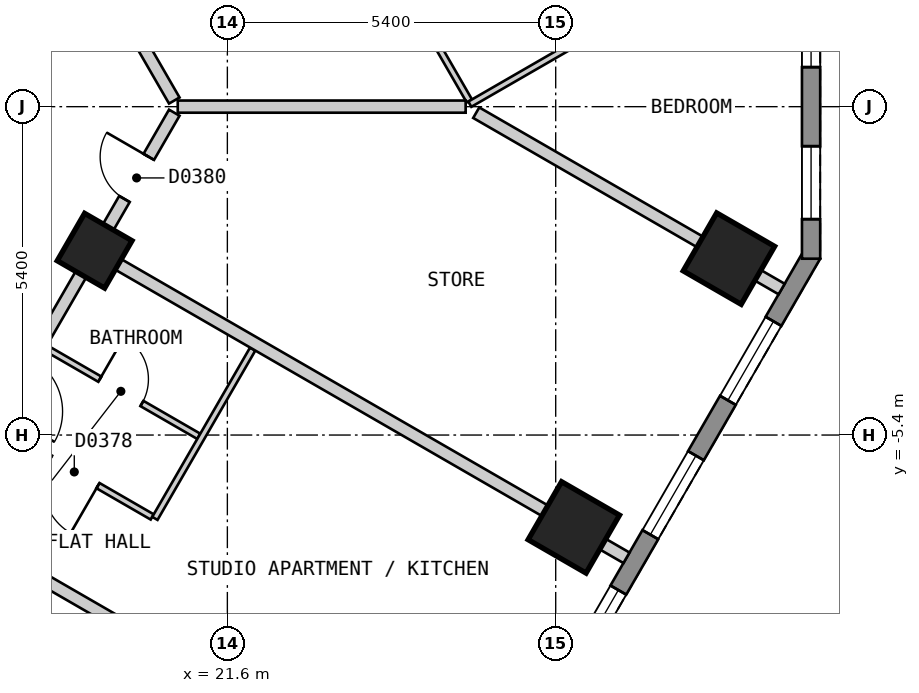
"""IFC4 building model, lengths in metres.
Left out: names, types, materials, properties, quantities, classifications, styles, units other than length and angle.
Written with IfcOpenShell. Run it as: python <this file> out.ifc"""

import sys

from ifc_helpers import new_model, si_unit, direction, frame, frame_2d, origin, origin_2d, place, context, subcontext, project, spatial, polyline, rectangle, outline, extrude, element, fill, save


model = new_model("IFC4")
c1 = context("Model", 3, precision=1e-05, world=origin(), true_north=direction((0.0, 1.0)))
c2 = subcontext(c1, "Body", "Model", "MODEL_VIEW")
j1 = project(units=[si_unit("LENGTHUNIT", "METRE"), si_unit("PLANEANGLEUNIT", "RADIAN")], contexts=[c1])
p1 = place(None, origin())
s1 = spatial("IfcSite", under=j1, at=p1, CompositionType="ELEMENT")
p2 = place(p1, origin())
s2 = spatial("IfcBuilding", under=s1, at=p2, CompositionType="ELEMENT")
p3 = place(p2, frame((0.0, 0.0, 59.4)))
s3 = spatial("IfcBuildingStorey", under=s2, at=p3, CompositionType="ELEMENT", Elevation=59.4)
for number, where, z_axis, x_axis in (
    (1, (27.298, -6.919, 0.0), (0.0, 0.0, 1.0), (0.5, 0.866, 0.0)),
    (2, (29.849, -2.499, 0.0), (0.0, 0.0, 1.0), (0.5, 0.866, 0.0)),
):
    element("IfcColumn", number, at=place(p3, frame(where, z_axis=z_axis, x_axis=x_axis)), inside=s3, PredefinedType="COLUMN", context=c2, shape_type="SweptSolid", body=[
        extrude(rectangle(XDim=1.1, YDim=1.1, at=origin_2d()), origin(), (0.0, 0.0, 1.0), 3.0),
    ])
p4 = place(p3, frame((19.417, -2.369, 0.0), z_axis=(0.0, 0.0, 1.0), x_axis=(0.499984884929, 0.866034130299, 0.0)))
e3 = element("IfcColumn", 3, at=p4, inside=s3, PredefinedType="COLUMN", context=c2, shape_type="SweptSolid", body=[
    extrude(rectangle(XDim=0.9, YDim=0.9, at=origin_2d()), origin(), (0.0, 0.0, 1.0), 3.0),
])
p5 = place(p3, frame((17.71, -25.825, 0.0), z_axis=(0.0, 0.0, 1.0), x_axis=(0.500001938803, 0.866024284413, 0.0)))
e4 = element("IfcWall", 4, at=p5, inside=s3, PredefinedType="SOLIDWALL", context=c2, shape_type="SweptSolid", body=[
    extrude(outline(polyline([(0.0, -0.15), (27.02, -0.15), (26.94, 0.15), (0.08, 0.15), (0.0, -0.15)])), origin(), (0.0, 0.0, 1.0), 2.6),
])
p6 = place(p5, frame((1.277, 0.0, 0.15)))
e5 = element("IfcOpeningElement", 5, at=p6, cuts=e4, PredefinedType="OPENING", context=c2, shape_type="SweptSolid", body=[
    extrude(rectangle(XDim=1.5, YDim=2.1, at=frame_2d((0.75, 1.05))), frame((0.0, 0.16, 0.0), z_axis=(0.0, -1.0, 0.0), x_axis=(1.0, 0.0, 0.0)), (0.0, 0.0, 1.0), 0.32),
])
p7 = place(p5, frame((3.829, 0.0, 0.15)))
e6 = element("IfcOpeningElement", 6, at=p7, cuts=e4, PredefinedType="OPENING", context=c2, shape_type="SweptSolid", body=[
    extrude(rectangle(XDim=1.5, YDim=2.1, at=frame_2d((0.75, 1.05))), frame((0.0, 0.16, 0.0), z_axis=(0.0, -1.0, 0.0), x_axis=(1.0, 0.0, 0.0)), (0.0, 0.0, 1.0), 0.32),
])
p8 = place(p5, frame((6.382, 0.0, 0.15)))
e7 = element("IfcOpeningElement", 7, at=p8, cuts=e4, PredefinedType="OPENING", context=c2, shape_type="SweptSolid", body=[
    extrude(rectangle(XDim=1.5, YDim=2.1, at=frame_2d((0.75, 1.05))), frame((0.0, 0.16, 0.0), z_axis=(0.0, -1.0, 0.0), x_axis=(1.0, 0.0, 0.0)), (0.0, 0.0, 1.0), 0.32),
])
p9 = place(p5, frame((8.933, 0.0, 0.15)))
e8 = element("IfcOpeningElement", 8, at=p9, cuts=e4, PredefinedType="OPENING", context=c2, shape_type="SweptSolid", body=[
    extrude(rectangle(XDim=1.5, YDim=2.1, at=frame_2d((0.75, 1.05))), frame((0.0, 0.16, 0.0), z_axis=(0.0, -1.0, 0.0), x_axis=(1.0, 0.0, 0.0)), (0.0, 0.0, 1.0), 0.32),
])
p10 = place(p5, frame((11.485, 0.0, 0.15)))
e9 = element("IfcOpeningElement", 9, at=p10, cuts=e4, PredefinedType="OPENING", context=c2, shape_type="SweptSolid", body=[
    extrude(rectangle(XDim=1.5, YDim=2.1, at=frame_2d((0.75, 1.05))), frame((0.0, 0.16, 0.0), z_axis=(0.0, -1.0, 0.0), x_axis=(1.0, 0.0, 0.0)), (0.0, 0.0, 1.0), 0.32),
])
p11 = place(p5, frame((14.037, 0.0, 0.15)))
e10 = element("IfcOpeningElement", 10, at=p11, cuts=e4, PredefinedType="OPENING", context=c2, shape_type="SweptSolid", body=[
    extrude(rectangle(XDim=1.5, YDim=2.1, at=frame_2d((0.75, 1.05))), frame((0.0, 0.16, 0.0), z_axis=(0.0, -1.0, 0.0), x_axis=(1.0, 0.0, 0.0)), (0.0, 0.0, 1.0), 0.32),
])
p12 = place(p5, frame((16.589, 0.0, 0.15)))
e11 = element("IfcOpeningElement", 11, at=p12, cuts=e4, PredefinedType="OPENING", context=c2, shape_type="SweptSolid", body=[
    extrude(rectangle(XDim=1.5, YDim=2.1, at=frame_2d((0.75, 1.05))), frame((0.0, 0.16, 0.0), z_axis=(0.0, -1.0, 0.0), x_axis=(1.0, 0.0, 0.0)), (0.0, 0.0, 1.0), 0.32),
])
p13 = place(p5, frame((19.141, 0.0, 0.15)))
e12 = element("IfcOpeningElement", 12, at=p13, cuts=e4, PredefinedType="OPENING", context=c2, shape_type="SweptSolid", body=[
    extrude(rectangle(XDim=1.5, YDim=2.1, at=frame_2d((0.75, 1.05))), frame((0.0, 0.16, 0.0), z_axis=(0.0, -1.0, 0.0), x_axis=(1.0, 0.0, 0.0)), (0.0, 0.0, 1.0), 0.32),
])
p14 = place(p5, frame((21.693, 0.0, 0.15)))
e13 = element("IfcOpeningElement", 13, at=p14, cuts=e4, PredefinedType="OPENING", context=c2, shape_type="SweptSolid", body=[
    extrude(rectangle(XDim=1.5, YDim=2.1, at=frame_2d((0.75, 1.05))), frame((0.0, 0.16, 0.0), z_axis=(0.0, -1.0, 0.0), x_axis=(1.0, 0.0, 0.0)), (0.0, 0.0, 1.0), 0.32),
])
p15 = place(p5, frame((24.244, 0.0, 0.15)))
e14 = element("IfcOpeningElement", 14, at=p15, cuts=e4, PredefinedType="OPENING", context=c2, shape_type="SweptSolid", body=[
    extrude(rectangle(XDim=1.5, YDim=2.1, at=frame_2d((0.75, 1.05))), frame((0.0, 0.16, 0.0), z_axis=(0.0, -1.0, 0.0), x_axis=(1.0, 0.0, 0.0)), (0.0, 0.0, 1.0), 0.32),
])
p16 = place(p3, frame((31.2, -2.5, 0.0), z_axis=(0.0, 0.0, 1.0), x_axis=(0.0, 1.0, 0.0)))
e15 = element("IfcWall", 15, at=p16, inside=s3, PredefinedType="SOLIDWALL", context=c2, shape_type="SweptSolid", body=[
    extrude(outline(polyline([(0.0, -0.15), (5.0, -0.15), (4.92, 0.15), (0.08, 0.15), (0.0, -0.15)])), origin(), (0.0, 0.0, 1.0), 2.6),
])
p17 = place(p16, frame((0.65, 0.0, 0.15)))
e16 = element("IfcOpeningElement", 16, at=p17, cuts=e15, PredefinedType="OPENING", context=c2, shape_type="SweptSolid", body=[
    extrude(rectangle(XDim=1.2, YDim=2.1, at=frame_2d((0.6, 1.05))), frame((0.0, 0.16, 0.0), z_axis=(0.0, -1.0, 0.0), x_axis=(1.0, 0.0, 0.0)), (0.0, 0.0, 1.0), 0.32),
])
p18 = place(p16, frame((3.15, 0.0, 0.15)))
e17 = element("IfcOpeningElement", 17, at=p18, cuts=e15, PredefinedType="OPENING", context=c2, shape_type="SweptSolid", body=[
    extrude(rectangle(XDim=1.2, YDim=2.1, at=frame_2d((0.6, 1.05))), frame((0.0, 0.16, 0.0), z_axis=(0.0, -1.0, 0.0), x_axis=(1.0, 0.0, 0.0)), (0.0, 0.0, 1.0), 0.32),
])
p19 = place(p3, frame((10.45, 17.9, 0.0), z_axis=(0.0, 0.0, 1.0), x_axis=(0.500034352617, -0.866005569383, 0.0)))
e18 = element("IfcWall", 18, at=p19, inside=s3, PredefinedType="PARTITIONING", context=c2, shape_type="SweptSolid", body=[
    extrude(rectangle(XDim=20.553, YDim=0.2, at=frame_2d((10.276, 0.0))), origin(), (0.0, 0.0, 1.0), 2.6),
])
p20 = place(p19, frame((14.903, 0.0, 0.0)))
e19 = element("IfcOpeningElement", 19, at=p20, cuts=e18, PredefinedType="OPENING", context=c2, shape_type="SweptSolid", body=[
    extrude(rectangle(XDim=1.0, YDim=2.1, at=frame_2d((0.5, 1.05))), frame((0.0, 0.11, 0.0), z_axis=(0.0, -1.0, 0.0), x_axis=(1.0, 0.0, 0.0)), (0.0, 0.0, 1.0), 0.22),
])
p21 = place(p19, frame((9.775, 0.0, 0.0)))
e20 = element("IfcOpeningElement", 20, at=p21, cuts=e18, PredefinedType="OPENING", context=c2, shape_type="SweptSolid", body=[
    extrude(rectangle(XDim=1.0, YDim=2.1, at=frame_2d((0.5, 1.05))), frame((0.0, 0.11, 0.0), z_axis=(0.0, -1.0, 0.0), x_axis=(1.0, 0.0, 0.0)), (0.0, 0.0, 1.0), 0.22),
])
p22 = place(p19, frame((0.852, 0.0, 0.0)))
e21 = element("IfcOpeningElement", 21, at=p22, cuts=e18, PredefinedType="OPENING", context=c2, shape_type="SweptSolid", body=[
    extrude(rectangle(XDim=0.8, YDim=2.1, at=frame_2d((0.4, 1.05))), frame((0.0, 0.11, 0.0), z_axis=(0.0, -1.0, 0.0), x_axis=(1.0, 0.0, 0.0)), (0.0, 0.0, 1.0), 0.22),
])
p23 = place(p3, frame((16.914, -6.703, 0.0), z_axis=(0.0, 0.0, 1.0), x_axis=(0.50003007663, 0.866008038338, 0.0)))
e22 = element("IfcWall", 22, at=p23, inside=s3, PredefinedType="PARTITIONING", context=c2, shape_type="SweptSolid", body=[
    extrude(rectangle(XDim=7.625, YDim=0.2, at=frame_2d((3.813, 0.0))), origin(), (0.0, 0.0, 1.0), 2.6),
])
p24 = place(p23, frame((1.952, 0.0, 0.0)))
e23 = element("IfcOpeningElement", 23, at=p24, cuts=e22, PredefinedType="OPENING", context=c2, shape_type="SweptSolid", body=[
    extrude(rectangle(XDim=1.0, YDim=2.1, at=frame_2d((0.5, 1.05))), frame((0.0, 0.11, 0.0), z_axis=(0.0, -1.0, 0.0), x_axis=(1.0, 0.0, 0.0)), (0.0, 0.0, 1.0), 0.22),
])
p25 = place(p23, frame((5.987, 0.0, 0.0)))
e24 = element("IfcOpeningElement", 24, at=p25, cuts=e22, PredefinedType="OPENING", context=c2, shape_type="SweptSolid", body=[
    extrude(rectangle(XDim=0.8, YDim=2.1, at=frame_2d((0.4, 1.05))), frame((0.0, 0.11, 0.0), z_axis=(0.0, -1.0, 0.0), x_axis=(1.0, 0.0, 0.0)), (0.0, 0.0, 1.0), 0.22),
])
p26 = place(p3, frame((20.551, 8.805, 0.0), z_axis=(0.0, 0.0, 1.0), x_axis=(0.499984387913, -0.86603441724, 0.0)))
e25 = element("IfcWall", 25, at=p26, inside=s3, PredefinedType="PARTITIONING", context=c2, shape_type="SweptSolid", body=[
    extrude(rectangle(XDim=10.058, YDim=0.1, at=frame_2d((5.029, 0.0))), origin(), (0.0, 0.0, 1.0), 2.6),
])
p27 = place(p26, frame((1.978, 0.0, 0.0)))
e26 = element("IfcOpeningElement", 26, at=p27, cuts=e25, PredefinedType="OPENING", context=c2, shape_type="SweptSolid", body=[
    extrude(rectangle(XDim=0.9, YDim=2.1, at=frame_2d((0.45, 1.05))), frame((0.0, 0.06, 0.0), z_axis=(0.0, -1.0, 0.0), x_axis=(1.0, 0.0, 0.0)), (0.0, 0.0, 1.0), 0.12),
])
p28 = place(p26, frame((7.157, 0.0, 0.0)))
e27 = element("IfcOpeningElement", 27, at=p28, cuts=e25, PredefinedType="OPENING", context=c2, shape_type="SweptSolid", body=[
    extrude(rectangle(XDim=0.8, YDim=2.1, at=frame_2d((0.4, 1.05))), frame((0.0, 0.06, 0.0), z_axis=(0.0, -1.0, 0.0), x_axis=(1.0, 0.0, 0.0)), (0.0, 0.0, 1.0), 0.12),
])
p29 = place(p3, frame((17.844, -5.292, 0.0), z_axis=(0.0, 0.0, 1.0), x_axis=(0.866003949776, -0.500037157592, 0.0)))
e28 = element("IfcWall", 28, at=p29, inside=s3, PredefinedType="PARTITIONING", context=c2, shape_type="SweptSolid", body=[
    extrude(rectangle(XDim=2.91, YDim=0.1, at=frame_2d((1.455, 0.0))), origin(), (0.0, 0.0, 1.0), 2.6),
])
p30 = place(p29, frame((0.98, 0.0, 0.0)))
e29 = element("IfcOpeningElement", 29, at=p30, cuts=e28, PredefinedType="OPENING", context=c2, shape_type="SweptSolid", body=[
    extrude(rectangle(XDim=0.9, YDim=2.1, at=frame_2d((0.45, 1.05))), frame((0.0, 0.06, 0.0), z_axis=(0.0, -1.0, 0.0), x_axis=(1.0, 0.0, 0.0)), (0.0, 0.0, 1.0), 0.12),
])
p31 = place(p3, frame((18.61, -3.966, 0.0), z_axis=(0.0, 0.0, 1.0), x_axis=(0.866019304365, -0.500010564355, 0.0)))
e30 = element("IfcWall", 30, at=p31, inside=s3, PredefinedType="PARTITIONING", context=c2, shape_type="SweptSolid", body=[
    extrude(rectangle(XDim=2.91, YDim=0.1, at=frame_2d((1.455, 0.0))), origin(), (0.0, 0.0, 1.0), 2.6),
])
p32 = place(p31, frame((1.03, 0.0, 0.0)))
e31 = element("IfcOpeningElement", 31, at=p32, cuts=e30, PredefinedType="OPENING", context=c2, shape_type="SweptSolid", body=[
    extrude(rectangle(XDim=0.8, YDim=2.1, at=frame_2d((0.4, 1.05))), frame((0.0, 0.06, 0.0), z_axis=(0.0, -1.0, 0.0), x_axis=(1.0, 0.0, 0.0)), (0.0, 0.0, 1.0), 0.12),
])
p33 = place(p3, frame((20.408, -6.771, 0.0), z_axis=(0.0, 0.0, 1.0), x_axis=(0.500197891286, 0.865911121047, 0.0)))
e32 = element("IfcWall", 32, at=p33, inside=s3, PredefinedType="PARTITIONING", context=c2, shape_type="SweptSolid", body=[
    extrude(rectangle(XDim=3.215, YDim=0.1, at=frame_2d((1.607, 0.0))), origin(), (0.0, 0.0, 1.0), 2.6),
])
p34 = place(p3, frame((25.588, 0.041, 0.0), z_axis=(0.0, 0.0, 1.0), x_axis=(0.866113484451, 0.499847408768, 0.0)))
e33 = element("IfcWall", 33, at=p34, inside=s3, PredefinedType="PARTITIONING", context=c2, shape_type="SweptSolid", body=[
    extrude(rectangle(XDim=5.92, YDim=0.1, at=frame_2d((2.96, 0.0))), origin(), (0.0, 0.0, 1.0), 2.6),
])
p35 = place(p34, frame((2.51, 0.0, 0.0)))
e34 = element("IfcOpeningElement", 34, at=p35, cuts=e33, PredefinedType="OPENING", context=c2, shape_type="SweptSolid", body=[
    extrude(rectangle(XDim=0.9, YDim=2.1, at=frame_2d((0.45, 1.05))), frame((0.0, 0.06, 0.0), z_axis=(0.0, -1.0, 0.0), x_axis=(1.0, 0.0, 0.0)), (0.0, 0.0, 1.0), 0.12),
])
p36 = place(p3, frame((19.503, -2.419, 0.0), z_axis=(0.0, 0.0, 1.0), x_axis=(0.866047370643, -0.499961950354, 0.0)))
e35 = element("IfcWall", 35, at=p36, inside=s3, PredefinedType="PARTITIONING", context=c2, shape_type="SweptSolid", body=[
    extrude(rectangle(XDim=10.001, YDim=0.2, at=frame_2d((5.0, 0.0))), origin(), (0.0, 0.0, 1.0), 2.6),
])
p37 = place(p3, frame((25.693, -0.099, 0.0), z_axis=(0.0, 0.0, 1.0), x_axis=(0.866032775405, -0.499987231761, 0.0)))
e36 = element("IfcWall", 36, at=p37, inside=s3, PredefinedType="PARTITIONING", context=c2, shape_type="SweptSolid", body=[
    extrude(rectangle(XDim=5.8, YDim=0.2, at=frame_2d((2.9, 0.0))), origin(), (0.0, 0.0, 1.0), 2.6),
])
p38 = place(p3, frame((16.916, -6.819, 0.0), z_axis=(0.0, 0.0, 1.0), x_axis=(0.866028876723, -0.499993984646, 0.0)))
e37 = element("IfcWall", 37, at=p38, inside=s3, PredefinedType="PARTITIONING", context=c2, shape_type="SweptSolid", body=[
    extrude(rectangle(XDim=10.04, YDim=0.2, at=frame_2d((5.02, 0.0))), origin(), (0.0, 0.0, 1.0), 2.6),
])
p39 = place(p3, frame((20.784, 0.001, 0.0), z_axis=(0.0, 0.0, 1.0), x_axis=(1.0, 0.0, 0.0)))
e38 = element("IfcWall", 38, at=p39, inside=s3, PredefinedType="PARTITIONING", context=c2, shape_type="SweptSolid", body=[
    extrude(rectangle(XDim=4.735, YDim=0.2, at=frame_2d((2.368, 0.0))), origin(), (0.0, 0.0, 1.0), 2.6),
])
p40 = place(p13, origin())
e39 = element("IfcWindow", 39, at=p40, inside=s3, PartitioningType="SINGLE_PANEL", PredefinedType="WINDOW", context=c2, shape_type="SweptSolid", body=[
    extrude(rectangle(XDim=1.5, YDim=2.1, at=frame_2d((0.75, 1.05))), frame((0.0, 0.03, 0.0), z_axis=(0.0, -1.0, 0.0), x_axis=(1.0, 0.0, 0.0)), (0.0, 0.0, 1.0), 0.06),
])
fill(e12, e39)
p41 = place(p14, origin())
e40 = element("IfcWindow", 40, at=p41, inside=s3, PartitioningType="SINGLE_PANEL", PredefinedType="WINDOW", context=c2, shape_type="SweptSolid", body=[
    extrude(rectangle(XDim=1.5, YDim=2.1, at=frame_2d((0.75, 1.05))), frame((0.0, 0.03, 0.0), z_axis=(0.0, -1.0, 0.0), x_axis=(1.0, 0.0, 0.0)), (0.0, 0.0, 1.0), 0.06),
])
fill(e13, e40)
p42 = place(p15, origin())
e41 = element("IfcWindow", 41, at=p42, inside=s3, PartitioningType="SINGLE_PANEL", PredefinedType="WINDOW", context=c2, shape_type="SweptSolid", body=[
    extrude(rectangle(XDim=1.5, YDim=2.1, at=frame_2d((0.75, 1.05))), frame((0.0, 0.03, 0.0), z_axis=(0.0, -1.0, 0.0), x_axis=(1.0, 0.0, 0.0)), (0.0, 0.0, 1.0), 0.06),
])
fill(e14, e41)
p43 = place(p17, origin())
e42 = element("IfcWindow", 42, at=p43, inside=s3, PartitioningType="SINGLE_PANEL", PredefinedType="WINDOW", context=c2, shape_type="SweptSolid", body=[
    extrude(rectangle(XDim=1.2, YDim=2.1, at=frame_2d((0.6, 1.05))), frame((0.0, 0.03, 0.0), z_axis=(0.0, -1.0, 0.0), x_axis=(1.0, 0.0, 0.0)), (0.0, 0.0, 1.0), 0.06),
])
fill(e16, e42)
p44 = place(p18, origin())
e43 = element("IfcWindow", 43, at=p44, inside=s3, PartitioningType="SINGLE_PANEL", PredefinedType="WINDOW", context=c2, shape_type="SweptSolid", body=[
    extrude(rectangle(XDim=1.2, YDim=2.1, at=frame_2d((0.6, 1.05))), frame((0.0, 0.03, 0.0), z_axis=(0.0, -1.0, 0.0), x_axis=(1.0, 0.0, 0.0)), (0.0, 0.0, 1.0), 0.06),
])
fill(e17, e43)
p45 = place(p30, origin())
e44 = element("IfcDoor", 44, at=p45, inside=s3, OperationType="SINGLE_SWING_RIGHT", PredefinedType="DOOR", context=c2, shape_type="SweptSolid", body=[
    extrude(rectangle(XDim=0.9, YDim=2.1, at=frame_2d((0.45, 1.05))), frame((0.0, 0.025, 0.0), z_axis=(0.0, -1.0, 0.0), x_axis=(1.0, 0.0, 0.0)), (0.0, 0.0, 1.0), 0.05),
])
fill(e29, e44)
p46 = place(p32, origin())
e45 = element("IfcDoor", 45, at=p46, inside=s3, OperationType="SINGLE_SWING_LEFT", PredefinedType="DOOR", context=c2, shape_type="SweptSolid", body=[
    extrude(rectangle(XDim=0.8, YDim=2.1, at=frame_2d((0.4, 1.05))), frame((0.0, 0.025, 0.0), z_axis=(0.0, -1.0, 0.0), x_axis=(1.0, 0.0, 0.0)), (0.0, 0.0, 1.0), 0.05),
])
fill(e31, e45)
p47 = place(p25, origin())
e46 = element("IfcDoor", 46, at=p47, inside=s3, OperationType="SINGLE_SWING_RIGHT", PredefinedType="DOOR", context=c2, shape_type="SweptSolid", body=[
    extrude(rectangle(XDim=0.8, YDim=2.1, at=frame_2d((0.4, 1.05))), frame((0.0, 0.025, 0.0), z_axis=(0.0, -1.0, 0.0), x_axis=(1.0, 0.0, 0.0)), (0.0, 0.0, 1.0), 0.05),
])
fill(e24, e46)
save(model, sys.argv[1])
